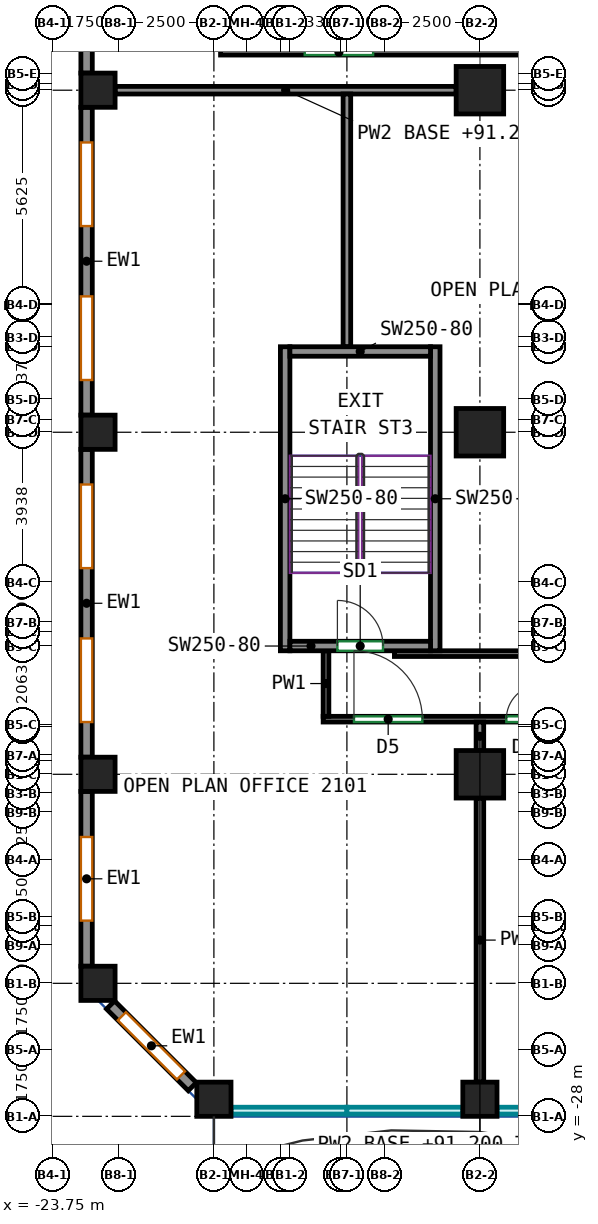
"""IFC4 building model, lengths in metres.
Left out: names, types, materials, properties, quantities, classifications, styles, units other than length and angle.
Written with IfcOpenShell. Run it as: python <this file> out.ifc"""

import sys

from ifc_helpers import new_model, si_unit, direction, frame, frame_2d, origin, origin_2d, place, context, subcontext, project, spatial, rectangle, extrude, source, transform, mapped, element, fill, save


model = new_model("IFC4")
c1 = context("Model", 3, precision=1e-05, world=origin(), true_north=direction((0.0, 1.0)))
c2 = subcontext(c1, "Body", "Model", "MODEL_VIEW")
j1 = project(units=[si_unit("LENGTHUNIT", "METRE"), si_unit("PLANEANGLEUNIT", "RADIAN")], contexts=[c1])
p1 = place(None, origin())
s1 = spatial("IfcSite", under=j1, at=p1, CompositionType="ELEMENT")
p2 = place(p1, origin())
s2 = spatial("IfcBuilding", under=s1, at=p2, CompositionType="ELEMENT")
p3 = place(p2, frame((0.0, 0.0, 91.2)))
s3 = spatial("IfcBuildingStorey", under=s2, at=p3, CompositionType="ELEMENT", Elevation=91.2)
m1 = source(origin(), c2, "Body", "SweptSolid", [
    extrude(rectangle(XDim=0.9, YDim=0.9, at=origin_2d()), origin(), (0.0, 0.0, 1.0), 3.6),
])
for number, where, z_axis, x_axis in (
    (1, (-22.55, -24.5, 0.0), (0.0, 0.0, 1.0), (1.0, 0.0, 0.0)),
    (2, (-22.55, -19.0, 0.0), (0.0, 0.0, 1.0), (1.0, 0.0, 0.0)),
    (3, (-22.55, -10.0, 0.0), (0.0, 0.0, 1.0), (1.0, 0.0, 0.0)),
    (4, (-22.55, -1.0, 0.0), (0.0, 0.0, 1.0), (1.0, 0.0, 0.0)),
    (5, (-19.5, -27.55, 0.0), (0.0, 0.0, 1.0), (1.0, 0.0, 0.0)),
    (6, (-12.5, -27.55, 0.0), (0.0, 0.0, 1.0), (1.0, 0.0, 0.0)),
):
    element("IfcColumn", number, at=place(p3, frame(where, z_axis=z_axis, x_axis=x_axis)), inside=s3, PredefinedType="COLUMN", context=c2, shape_type="MappedRepresentation", body=[
        mapped(m1, transform((0.0, 0.0, 0.0))),
    ])
m2 = source(origin(), c2, "Body", "SweptSolid", [
    extrude(rectangle(XDim=1.25, YDim=1.25, at=origin_2d()), origin(), (0.0, 0.0, 1.0), 3.6),
])
for number, where, z_axis, x_axis in (
    (7, (-12.5, -19.0, 0.0), (0.0, 0.0, 1.0), (1.0, 0.0, 0.0)),
    (8, (-12.5, -10.0, 0.0), (0.0, 0.0, 1.0), (1.0, 0.0, 0.0)),
    (9, (-12.5, -1.0, 0.0), (0.0, 0.0, 1.0), (1.0, 0.0, 0.0)),
):
    element("IfcColumn", number, at=place(p3, frame(where, z_axis=z_axis, x_axis=x_axis)), inside=s3, PredefinedType="COLUMN", context=c2, shape_type="MappedRepresentation", body=[
        mapped(m2, transform((0.0, 0.0, 0.0))),
    ])
m3 = source(origin(), c2, "Body", "SweptSolid", [
    extrude(rectangle(XDim=8.0, YDim=0.25, at=frame_2d((4.0, 0.0))), origin(), (0.0, 0.0, 1.0), 3.6),
])
for number, where, z_axis, x_axis in (
    (10, (-17.625, -15.75, 0.0), (0.0, 0.0, 1.0), (0.0, 1.0, 0.0)),
    (11, (-13.675, -15.75, 0.0), (0.0, 0.0, 1.0), (0.0, 1.0, 0.0)),
):
    element("IfcWall", number, at=place(p3, frame(where, z_axis=z_axis, x_axis=x_axis)), inside=s3, PredefinedType="SHEAR", context=c2, shape_type="MappedRepresentation", body=[
        mapped(m3, transform((0.0, 0.0, 0.0))),
    ])
m4 = source(origin(), c2, "Body", "SweptSolid", [
    extrude(rectangle(XDim=3.7, YDim=0.25, at=frame_2d((1.85, 0.0))), origin(), (0.0, 0.0, 1.0), 3.6),
])
p4 = place(p3, frame((-17.5, -15.625, 0.0), z_axis=(0.0, 0.0, 1.0), x_axis=(1.0, 0.0, 0.0)))
e12 = element("IfcWall", 12, at=p4, inside=s3, PredefinedType="SHEAR", context=c2, shape_type="MappedRepresentation", body=[
    mapped(m4, transform((0.0, 0.0, 0.0))),
])
p5 = place(p4, frame((1.25, 0.0, 0.0)))
e13 = element("IfcOpeningElement", 13, at=p5, cuts=e12, PredefinedType="OPENING", context=c2, shape_type="SweptSolid", body=[
    extrude(rectangle(XDim=1.2, YDim=2.1, at=frame_2d((0.6, 1.05))), frame((0.0, 0.135, 0.0), z_axis=(0.0, -1.0, 0.0), x_axis=(1.0, 0.0, 0.0)), (0.0, 0.0, 1.0), 0.27),
])
p6 = place(p3, frame((-17.5, -7.875, 0.0), z_axis=(0.0, 0.0, 1.0), x_axis=(1.0, 0.0, 0.0)))
e14 = element("IfcWall", 14, at=p6, inside=s3, PredefinedType="SHEAR", context=c2, shape_type="MappedRepresentation", body=[
    mapped(m4, transform((0.0, 0.0, 0.0))),
])
m5 = source(origin(), c2, "Body", "SweptSolid", [
    extrude(rectangle(XDim=8.1, YDim=0.3, at=frame_2d((4.05, 0.0))), origin(), (0.0, 0.0, 1.0), 3.6),
])
p7 = place(p3, frame((-22.85, 7.55, 0.0), z_axis=(0.0, 0.0, 1.0), x_axis=(0.0, -1.0, 0.0)))
e15 = element("IfcWall", 15, at=p7, inside=s3, PredefinedType="SOLIDWALL", context=c2, shape_type="MappedRepresentation", body=[
    mapped(m5, transform((0.0, 0.0, 0.0))),
])
p8 = place(p7, frame((0.925, 0.0, 0.7)))
e16 = element("IfcOpeningElement", 16, at=p8, cuts=e15, PredefinedType="OPENING", context=c2, shape_type="SweptSolid", body=[
    extrude(rectangle(XDim=2.2, YDim=2.25, at=frame_2d((1.1, 1.125))), frame((0.0, 0.16, 0.0), z_axis=(0.0, -1.0, 0.0), x_axis=(1.0, 0.0, 0.0)), (0.0, 0.0, 1.0), 0.32),
])
p9 = place(p7, frame((4.975, 0.0, 0.7)))
e17 = element("IfcOpeningElement", 17, at=p9, cuts=e15, PredefinedType="OPENING", context=c2, shape_type="SweptSolid", body=[
    extrude(rectangle(XDim=2.2, YDim=2.25, at=frame_2d((1.1, 1.125))), frame((0.0, 0.16, 0.0), z_axis=(0.0, -1.0, 0.0), x_axis=(1.0, 0.0, 0.0)), (0.0, 0.0, 1.0), 0.32),
])
p10 = place(p3, frame((-22.85, -1.45, 0.0), z_axis=(0.0, 0.0, 1.0), x_axis=(0.0, -1.0, 0.0)))
e18 = element("IfcWall", 18, at=p10, inside=s3, PredefinedType="SOLIDWALL", context=c2, shape_type="MappedRepresentation", body=[
    mapped(m5, transform((0.0, 0.0, 0.0))),
])
p11 = place(p10, frame((0.925, 0.0, 0.7)))
e19 = element("IfcOpeningElement", 19, at=p11, cuts=e18, PredefinedType="OPENING", context=c2, shape_type="SweptSolid", body=[
    extrude(rectangle(XDim=2.2, YDim=2.25, at=frame_2d((1.1, 1.125))), frame((0.0, 0.16, 0.0), z_axis=(0.0, -1.0, 0.0), x_axis=(1.0, 0.0, 0.0)), (0.0, 0.0, 1.0), 0.32),
])
p12 = place(p10, frame((4.975, 0.0, 0.7)))
e20 = element("IfcOpeningElement", 20, at=p12, cuts=e18, PredefinedType="OPENING", context=c2, shape_type="SweptSolid", body=[
    extrude(rectangle(XDim=2.2, YDim=2.25, at=frame_2d((1.1, 1.125))), frame((0.0, 0.16, 0.0), z_axis=(0.0, -1.0, 0.0), x_axis=(1.0, 0.0, 0.0)), (0.0, 0.0, 1.0), 0.32),
])
p13 = place(p3, frame((-22.85, -10.45, 0.0), z_axis=(0.0, 0.0, 1.0), x_axis=(0.0, -1.0, 0.0)))
e21 = element("IfcWall", 21, at=p13, inside=s3, PredefinedType="SOLIDWALL", context=c2, shape_type="MappedRepresentation", body=[
    mapped(m5, transform((0.0, 0.0, 0.0))),
])
p14 = place(p13, frame((0.925, 0.0, 0.7)))
e22 = element("IfcOpeningElement", 22, at=p14, cuts=e21, PredefinedType="OPENING", context=c2, shape_type="SweptSolid", body=[
    extrude(rectangle(XDim=2.2, YDim=2.25, at=frame_2d((1.1, 1.125))), frame((0.0, 0.16, 0.0), z_axis=(0.0, -1.0, 0.0), x_axis=(1.0, 0.0, 0.0)), (0.0, 0.0, 1.0), 0.32),
])
p15 = place(p13, frame((4.975, 0.0, 0.7)))
e23 = element("IfcOpeningElement", 23, at=p15, cuts=e21, PredefinedType="OPENING", context=c2, shape_type="SweptSolid", body=[
    extrude(rectangle(XDim=2.2, YDim=2.25, at=frame_2d((1.1, 1.125))), frame((0.0, 0.16, 0.0), z_axis=(0.0, -1.0, 0.0), x_axis=(1.0, 0.0, 0.0)), (0.0, 0.0, 1.0), 0.32),
])
m6 = source(origin(), c2, "Body", "SweptSolid", [
    extrude(rectangle(XDim=4.6, YDim=0.3, at=frame_2d((2.3, 0.0))), origin(), (0.0, 0.0, 1.0), 3.6),
])
p16 = place(p3, frame((-22.85, -19.45, 0.0), z_axis=(0.0, 0.0, 1.0), x_axis=(0.0, -1.0, 0.0)))
e24 = element("IfcWall", 24, at=p16, inside=s3, PredefinedType="SOLIDWALL", context=c2, shape_type="MappedRepresentation", body=[
    mapped(m6, transform((0.0, 0.0, 0.0))),
])
p17 = place(p16, frame((1.2, 0.0, 0.7)))
e25 = element("IfcOpeningElement", 25, at=p17, cuts=e24, PredefinedType="OPENING", context=c2, shape_type="SweptSolid", body=[
    extrude(rectangle(XDim=2.2, YDim=2.25, at=frame_2d((1.1, 1.125))), frame((0.0, 0.16, 0.0), z_axis=(0.0, -1.0, 0.0), x_axis=(1.0, 0.0, 0.0)), (0.0, 0.0, 1.0), 0.32),
])
m7 = source(origin(), c2, "Body", "SweptSolid", [
    extrude(rectangle(XDim=3.041, YDim=0.3, at=frame_2d((1.521, 0.0))), origin(), (0.0, 0.0, 1.0), 3.6),
])
p18 = place(p3, frame((-22.219, -25.069, 0.0), z_axis=(0.0, 0.0, 1.0), x_axis=(0.707106781187, -0.707106781187, 0.0)))
e26 = element("IfcWall", 26, at=p18, inside=s3, PredefinedType="SOLIDWALL", context=c2, shape_type="MappedRepresentation", body=[
    mapped(m7, transform((0.0, 0.0, 0.0))),
])
p19 = place(p18, frame((0.42, 0.0, 0.7)))
e27 = element("IfcOpeningElement", 27, at=p19, cuts=e26, PredefinedType="OPENING", context=c2, shape_type="SweptSolid", body=[
    extrude(rectangle(XDim=2.2, YDim=2.25, at=frame_2d((1.1, 1.125))), frame((0.0, 0.16, 0.0), z_axis=(0.0, -1.0, 0.0), x_axis=(1.0, 0.0, 0.0)), (0.0, 0.0, 1.0), 0.32),
])
p20 = place(p3, frame((-16.625, -17.55, 0.0), z_axis=(0.0, 0.0, 1.0), x_axis=(1.0, 0.0, 0.0)))
e28 = element("IfcWall", 28, at=p20, inside=s3, PredefinedType="PARTITIONING", context=c2, shape_type="SweptSolid", body=[
    extrude(rectangle(XDim=14.698, YDim=0.15, at=frame_2d((7.349, 0.0))), origin(), (0.0, 0.0, 1.0), 3.6),
])
p21 = place(p20, frame((0.811, 0.0, 0.0)))
e29 = element("IfcOpeningElement", 29, at=p21, cuts=e28, PredefinedType="OPENING", context=c2, shape_type="SweptSolid", body=[
    extrude(rectangle(XDim=1.8, YDim=2.1, at=frame_2d((0.9, 1.05))), frame((0.0, 0.085, 0.0), z_axis=(0.0, -1.0, 0.0), x_axis=(1.0, 0.0, 0.0)), (0.0, 0.0, 1.0), 0.17),
])
p22 = place(p20, frame((4.82, 0.0, 0.0)))
e30 = element("IfcOpeningElement", 30, at=p22, cuts=e28, PredefinedType="OPENING", context=c2, shape_type="SweptSolid", body=[
    extrude(rectangle(XDim=0.9, YDim=2.1, at=frame_2d((0.45, 1.05))), frame((0.0, 0.085, 0.0), z_axis=(0.0, -1.0, 0.0), x_axis=(1.0, 0.0, 0.0)), (0.0, 0.0, 1.0), 0.17),
])
p23 = place(p3, frame((-16.55, -15.75, 0.0), z_axis=(0.0, 0.0, 1.0), x_axis=(0.0, -1.0, 0.0)))
e31 = element("IfcWall", 31, at=p23, inside=s3, PredefinedType="PARTITIONING", context=c2, shape_type="SweptSolid", body=[
    extrude(rectangle(XDim=1.725, YDim=0.15, at=frame_2d((0.863, 0.0))), origin(), (0.0, 0.0, 1.0), 3.6),
])
p24 = place(p3, frame((-19.325, 0.0, 0.0), z_axis=(0.0, 0.0, 1.0), x_axis=(1.0, 0.0, 0.0)))
e32 = element("IfcWall", 32, at=p24, inside=s3, PredefinedType="PARTITIONING", context=c2, shape_type="SweptSolid", body=[
    extrude(rectangle(XDim=23.2, YDim=0.15, at=frame_2d((11.6, 0.0))), origin(), (0.0, 0.0, 1.0), 3.6),
])
p25 = place(p24, frame((2.215, 0.0, 0.0)))
e33 = element("IfcOpeningElement", 33, at=p25, cuts=e32, PredefinedType="OPENING", context=c2, shape_type="SweptSolid", body=[
    extrude(rectangle(XDim=1.8, YDim=2.1, at=frame_2d((0.9, 1.05))), frame((0.0, 0.085, 0.0), z_axis=(0.0, -1.0, 0.0), x_axis=(1.0, 0.0, 0.0)), (0.0, 0.0, 1.0), 0.17),
])
p26 = place(p3, frame((-5.49, -15.825, 0.0), z_axis=(0.0, 0.0, 1.0), x_axis=(-1.0, 0.0, 0.0)))
e34 = element("IfcWall", 34, at=p26, inside=s3, PredefinedType="PARTITIONING", context=c2, shape_type="SweptSolid", body=[
    extrude(rectangle(XDim=9.26, YDim=0.15, at=frame_2d((4.63, 0.0))), origin(), (0.0, 0.0, 1.0), 3.6),
])
p27 = place(p26, frame((0.905, 0.0, 0.0)))
e35 = element("IfcOpeningElement", 35, at=p27, cuts=e34, PredefinedType="OPENING", context=c2, shape_type="SweptSolid", body=[
    extrude(rectangle(XDim=0.9, YDim=2.1, at=frame_2d((0.45, 1.05))), frame((0.0, 0.085, 0.0), z_axis=(0.0, -1.0, 0.0), x_axis=(1.0, 0.0, 0.0)), (0.0, 0.0, 1.0), 0.17),
])
p28 = place(p3, frame((-12.5, -18.375, 0.0), z_axis=(0.0, 0.0, 1.0), x_axis=(0.0, 1.0, 0.0)))
e36 = element("IfcWall", 36, at=p28, inside=s3, PredefinedType="PARTITIONING", context=c2, shape_type="SweptSolid", body=[
    extrude(rectangle(XDim=0.749, YDim=0.2, at=frame_2d((0.375, 0.0))), origin(), (0.0, 0.0, 1.0), 2.95),
])
p29 = place(p3, frame((-12.5, -27.1, 0.0), z_axis=(0.0, 0.0, 1.0), x_axis=(0.0, 1.0, 0.0)))
e37 = element("IfcWall", 37, at=p29, inside=s3, PredefinedType="PARTITIONING", context=c2, shape_type="SweptSolid", body=[
    extrude(rectangle(XDim=7.475, YDim=0.2, at=frame_2d((3.738, 0.0))), origin(), (0.0, 0.0, 1.0), 2.95),
])
p30 = place(p3, frame((-22.1, -1.0, 0.0), z_axis=(0.0, 0.0, 1.0), x_axis=(1.0, 0.0, 0.0)))
e38 = element("IfcWall", 38, at=p30, inside=s3, PredefinedType="PARTITIONING", context=c2, shape_type="SweptSolid", body=[
    extrude(rectangle(XDim=8.975, YDim=0.2, at=frame_2d((4.488, 0.0))), origin(), (0.0, 0.0, 1.0), 2.95),
])
p31 = place(p3, frame((-16.0, -7.75, 0.0), z_axis=(0.0, 0.0, 1.0), x_axis=(0.0, 1.0, 0.0)))
e39 = element("IfcWall", 39, at=p31, inside=s3, PredefinedType="PARTITIONING", context=c2, shape_type="SweptSolid", body=[
    extrude(rectangle(XDim=6.65, YDim=0.2, at=frame_2d((3.325, 0.0))), origin(), (0.0, 0.0, 1.0), 3.6),
])
p32 = place(p11, origin())
e40 = element("IfcWindow", 40, at=p32, inside=s3, PartitioningType="SINGLE_PANEL", PredefinedType="WINDOW", context=c2, shape_type="SweptSolid", body=[
    extrude(rectangle(XDim=2.2, YDim=2.25, at=frame_2d((1.1, 1.125))), frame((0.0, 0.03, 0.0), z_axis=(0.0, -1.0, 0.0), x_axis=(1.0, 0.0, 0.0)), (0.0, 0.0, 1.0), 0.06),
])
fill(e19, e40)
p33 = place(p12, origin())
e41 = element("IfcWindow", 41, at=p33, inside=s3, PartitioningType="SINGLE_PANEL", PredefinedType="WINDOW", context=c2, shape_type="SweptSolid", body=[
    extrude(rectangle(XDim=2.2, YDim=2.25, at=frame_2d((1.1, 1.125))), frame((0.0, 0.03, 0.0), z_axis=(0.0, -1.0, 0.0), x_axis=(1.0, 0.0, 0.0)), (0.0, 0.0, 1.0), 0.06),
])
fill(e20, e41)
p34 = place(p14, origin())
e42 = element("IfcWindow", 42, at=p34, inside=s3, PartitioningType="SINGLE_PANEL", PredefinedType="WINDOW", context=c2, shape_type="SweptSolid", body=[
    extrude(rectangle(XDim=2.2, YDim=2.25, at=frame_2d((1.1, 1.125))), frame((0.0, 0.03, 0.0), z_axis=(0.0, -1.0, 0.0), x_axis=(1.0, 0.0, 0.0)), (0.0, 0.0, 1.0), 0.06),
])
fill(e22, e42)
p35 = place(p15, origin())
e43 = element("IfcWindow", 43, at=p35, inside=s3, PartitioningType="SINGLE_PANEL", PredefinedType="WINDOW", context=c2, shape_type="SweptSolid", body=[
    extrude(rectangle(XDim=2.2, YDim=2.25, at=frame_2d((1.1, 1.125))), frame((0.0, 0.03, 0.0), z_axis=(0.0, -1.0, 0.0), x_axis=(1.0, 0.0, 0.0)), (0.0, 0.0, 1.0), 0.06),
])
fill(e23, e43)
p36 = place(p17, origin())
e44 = element("IfcWindow", 44, at=p36, inside=s3, PartitioningType="SINGLE_PANEL", PredefinedType="WINDOW", context=c2, shape_type="SweptSolid", body=[
    extrude(rectangle(XDim=2.2, YDim=2.25, at=frame_2d((1.1, 1.125))), frame((0.0, 0.03, 0.0), z_axis=(0.0, -1.0, 0.0), x_axis=(1.0, 0.0, 0.0)), (0.0, 0.0, 1.0), 0.06),
])
fill(e25, e44)
p37 = place(p19, origin())
e45 = element("IfcWindow", 45, at=p37, inside=s3, PartitioningType="SINGLE_PANEL", PredefinedType="WINDOW", context=c2, shape_type="SweptSolid", body=[
    extrude(rectangle(XDim=2.2, YDim=2.25, at=frame_2d((1.1, 1.125))), frame((0.0, 0.03, 0.0), z_axis=(0.0, -1.0, 0.0), x_axis=(1.0, 0.0, 0.0)), (0.0, 0.0, 1.0), 0.06),
])
fill(e27, e45)
p38 = place(p5, origin())
e46 = element("IfcDoor", 46, at=p38, inside=s3, OperationType="DOUBLE_DOOR_SINGLE_SWING", PredefinedType="DOOR", context=c2, shape_type="SweptSolid", body=[
    extrude(rectangle(XDim=1.2, YDim=2.1, at=frame_2d((0.6, 1.05))), frame((0.0, 0.025, 0.0), z_axis=(0.0, -1.0, 0.0), x_axis=(1.0, 0.0, 0.0)), (0.0, 0.0, 1.0), 0.05),
])
fill(e13, e46)
p39 = place(p21, origin())
e47 = element("IfcDoor", 47, at=p39, inside=s3, OperationType="DOUBLE_DOOR_SINGLE_SWING", PredefinedType="DOOR", context=c2, shape_type="SweptSolid", body=[
    extrude(rectangle(XDim=1.8, YDim=2.1, at=frame_2d((0.9, 1.05))), frame((0.0, 0.025, 0.0), z_axis=(0.0, -1.0, 0.0), x_axis=(1.0, 0.0, 0.0)), (0.0, 0.0, 1.0), 0.05),
])
fill(e29, e47)
p40 = place(p22, origin())
e48 = element("IfcDoor", 48, at=p40, inside=s3, OperationType="SINGLE_SWING_RIGHT", PredefinedType="DOOR", context=c2, shape_type="SweptSolid", body=[
    extrude(rectangle(XDim=0.9, YDim=2.1, at=frame_2d((0.45, 1.05))), frame((0.0, 0.025, 0.0), z_axis=(0.0, -1.0, 0.0), x_axis=(1.0, 0.0, 0.0)), (0.0, 0.0, 1.0), 0.05),
])
fill(e30, e48)
p41 = place(p25, origin())
e49 = element("IfcDoor", 49, at=p41, inside=s3, OperationType="DOUBLE_DOOR_SINGLE_SWING", PredefinedType="DOOR", context=c2, shape_type="SweptSolid", body=[
    extrude(rectangle(XDim=1.8, YDim=2.1, at=frame_2d((0.9, 1.05))), frame((0.0, 0.025, 0.0), z_axis=(0.0, -1.0, 0.0), x_axis=(1.0, 0.0, 0.0)), (0.0, 0.0, 1.0), 0.05),
])
fill(e33, e49)
save(model, sys.argv[1])
